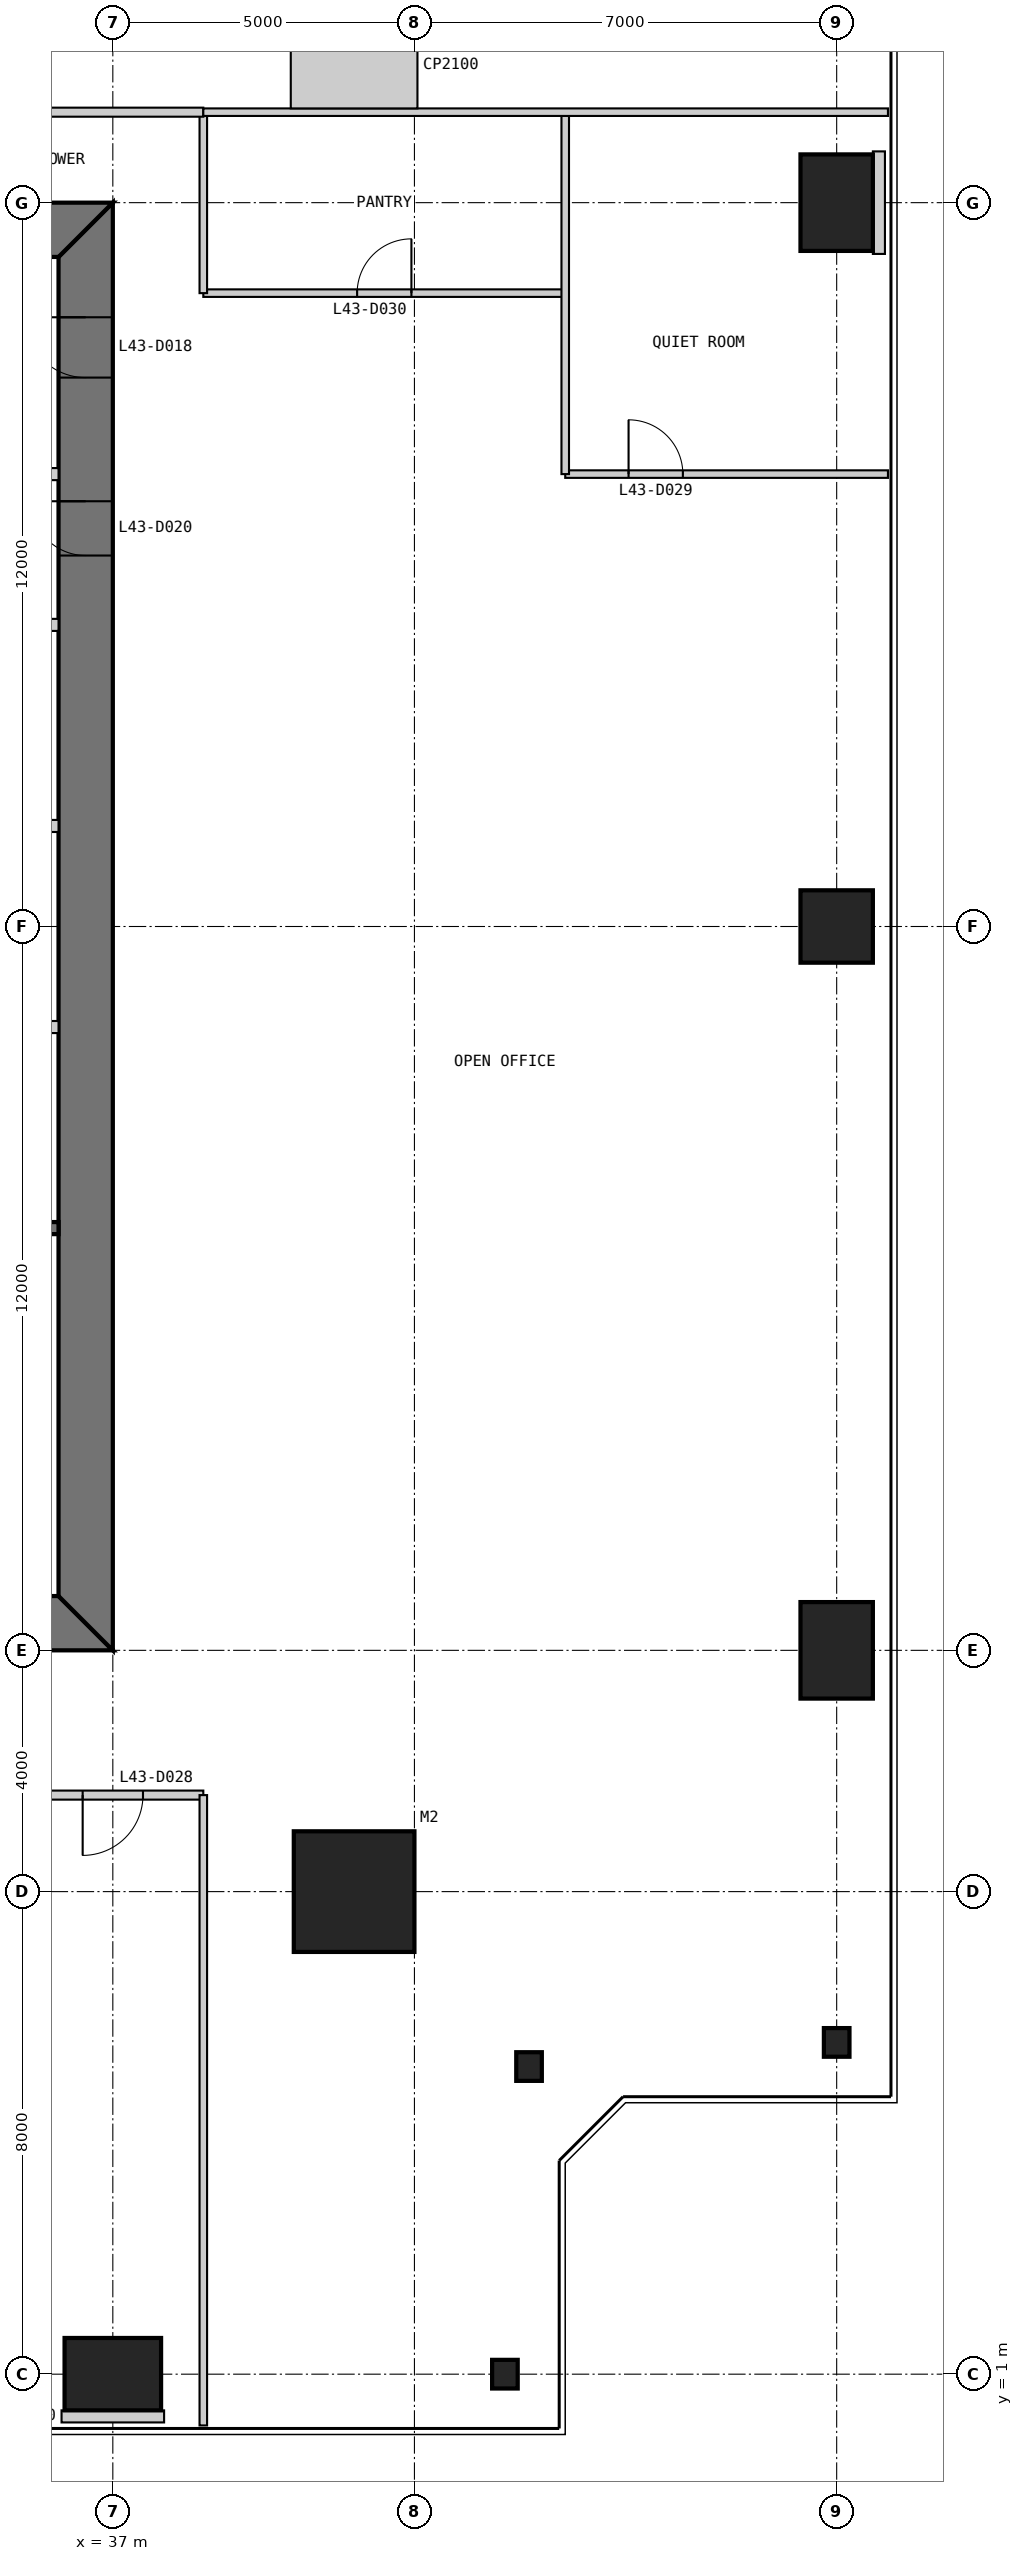
"""IFC4 building model, lengths in metres.
Left out: names, types, materials, properties, quantities, classifications, styles, units other than length and angle.
Written with IfcOpenShell. Run it as: python <this file> out.ifc"""

import sys

from ifc_helpers import new_model, si_unit, direction, frame, frame_2d, origin, origin_2d, place, context, subcontext, project, spatial, polyline, rectangle, i_section, outline, extrude, element, fill, save


model = new_model("IFC4")
c1 = context("Model", 3, precision=1e-05, world=origin(), true_north=direction((0.0, 1.0)))
c2 = subcontext(c1, "Body", "Model", "MODEL_VIEW")
j1 = project(units=[si_unit("LENGTHUNIT", "METRE"), si_unit("PLANEANGLEUNIT", "RADIAN")], contexts=[c1])
p1 = place(None, origin())
s1 = spatial("IfcSite", under=j1, at=p1, CompositionType="ELEMENT")
p2 = place(p1, origin())
s2 = spatial("IfcBuilding", under=s1, at=p2, CompositionType="ELEMENT")
p3 = place(p2, frame((0.0, 0.0, 185.8)))
s3 = spatial("IfcBuildingStorey", under=s2, at=p3, CompositionType="ELEMENT", Elevation=185.8)
p4 = place(p3, frame((41.0, 9.0, 0.0), z_axis=(0.0, 0.0, 1.0), x_axis=(1.0, 0.0, 0.0)))
e1 = element("IfcColumn", 1, at=p4, inside=s3, PredefinedType="COLUMN", context=c2, shape_type="SweptSolid", body=[
    extrude(rectangle(XDim=2.0, YDim=2.0, at=origin_2d()), origin(), (0.0, 0.0, 1.0), 4.0),
])
p5 = place(p3, frame((37.0, 1.0, 0.0), z_axis=(0.0, 0.0, 1.0), x_axis=(1.0, 0.0, 0.0)))
e2 = element("IfcColumn", 2, at=p5, inside=s3, PredefinedType="COLUMN", context=c2, shape_type="SweptSolid", body=[
    extrude(rectangle(XDim=1.6, YDim=1.2, at=origin_2d()), origin(), (0.0, 0.0, 1.0), 4.0),
])
for number, where, z_axis, x_axis in (
    (3, (43.5, 1.0, 0.0), (0.0, 0.0, 1.0), (1.0, 0.0, 0.0)),
    (4, (43.9, 6.1, 0.0), (0.0, 0.0, 1.0), (1.0, 0.0, 0.0)),
    (5, (49.0, 6.5, 0.0), (0.0, 0.0, 1.0), (1.0, 0.0, 0.0)),
):
    element("IfcColumn", number, at=place(p3, frame(where, z_axis=z_axis, x_axis=x_axis)), inside=s3, PredefinedType="COLUMN", context=c2, shape_type="SweptSolid", body=[
        extrude(i_section(OverallWidth=0.424, OverallDepth=0.475, WebThickness=0.048, FlangeThickness=0.077, at=origin_2d()), origin(), (0.0, 0.0, 1.0), 4.0),
    ])
p6 = place(p3, frame((49.0, 13.0, 0.0), z_axis=(0.0, 0.0, 1.0), x_axis=(1.0, 0.0, 0.0)))
e6 = element("IfcColumn", 6, at=p6, inside=s3, PredefinedType="COLUMN", context=c2, shape_type="SweptSolid", body=[
    extrude(rectangle(XDim=1.2, YDim=1.6, at=origin_2d()), origin(), (0.0, 0.0, 1.0), 4.0),
])
p7 = place(p3, frame((49.0, 25.0, 0.0), z_axis=(0.0, 0.0, 1.0), x_axis=(1.0, 0.0, 0.0)))
e7 = element("IfcColumn", 7, at=p7, inside=s3, PredefinedType="COLUMN", context=c2, shape_type="SweptSolid", body=[
    extrude(rectangle(XDim=1.2, YDim=1.2, at=origin_2d()), origin(), (0.0, 0.0, 1.0), 4.0),
])
p8 = place(p3, frame((49.0, 37.0, 0.0), z_axis=(0.0, 0.0, 1.0), x_axis=(1.0, 0.0, 0.0)))
e8 = element("IfcColumn", 8, at=p8, inside=s3, PredefinedType="COLUMN", context=c2, shape_type="SweptSolid", body=[
    extrude(rectangle(XDim=1.2, YDim=1.6, at=origin_2d()), origin(), (0.0, 0.0, 1.0), 4.0),
])
p9 = place(p3, frame((13.0, 13.45, 0.0), z_axis=(0.0, 0.0, 1.0), x_axis=(1.0, 0.0, 0.0)))
e9 = element("IfcWall", 9, at=p9, inside=s3, PredefinedType="SHEAR", context=c2, shape_type="SweptSolid", body=[
    extrude(outline(polyline([(0.0, -0.45), (24.0, -0.45), (23.1, 0.45), (0.9, 0.45), (0.0, -0.45)])), origin(), (0.0, 0.0, 1.0), 4.0),
])
p10 = place(p9, frame((4.9, 0.0, 0.0)))
e10 = element("IfcOpeningElement", 10, at=p10, cuts=e9, PredefinedType="OPENING", context=c2, shape_type="SweptSolid", body=[
    extrude(rectangle(XDim=1.0, YDim=2.2, at=frame_2d((0.5, 1.1))), frame((0.0, 0.46, 0.0), z_axis=(0.0, -1.0, 0.0), x_axis=(1.0, 0.0, 0.0)), (0.0, 0.0, 1.0), 0.92),
])
p11 = place(p9, frame((8.9, 0.0, 0.0)))
e11 = element("IfcOpeningElement", 11, at=p11, cuts=e9, PredefinedType="OPENING", context=c2, shape_type="SweptSolid", body=[
    extrude(rectangle(XDim=1.1, YDim=2.2, at=frame_2d((0.55, 1.1))), frame((0.0, 0.46, 0.0), z_axis=(0.0, -1.0, 0.0), x_axis=(1.0, 0.0, 0.0)), (0.0, 0.0, 1.0), 0.92),
])
p12 = place(p9, frame((15.05, 0.0, 0.0)))
e12 = element("IfcOpeningElement", 12, at=p12, cuts=e9, PredefinedType="OPENING", context=c2, shape_type="SweptSolid", body=[
    extrude(rectangle(XDim=0.9, YDim=2.2, at=frame_2d((0.45, 1.1))), frame((0.0, 0.46, 0.0), z_axis=(0.0, -1.0, 0.0), x_axis=(1.0, 0.0, 0.0)), (0.0, 0.0, 1.0), 0.92),
])
p13 = place(p9, frame((17.9, 0.0, 0.0)))
e13 = element("IfcOpeningElement", 13, at=p13, cuts=e9, PredefinedType="OPENING", context=c2, shape_type="SweptSolid", body=[
    extrude(rectangle(XDim=1.0, YDim=2.2, at=frame_2d((0.5, 1.1))), frame((0.0, 0.46, 0.0), z_axis=(0.0, -1.0, 0.0), x_axis=(1.0, 0.0, 0.0)), (0.0, 0.0, 1.0), 0.92),
])
p14 = place(p9, frame((21.4, 0.0, 0.0)))
e14 = element("IfcOpeningElement", 14, at=p14, cuts=e9, PredefinedType="OPENING", context=c2, shape_type="SweptSolid", body=[
    extrude(rectangle(XDim=1.0, YDim=2.2, at=frame_2d((0.5, 1.1))), frame((0.0, 0.46, 0.0), z_axis=(0.0, -1.0, 0.0), x_axis=(1.0, 0.0, 0.0)), (0.0, 0.0, 1.0), 0.92),
])
p15 = place(p3, frame((36.55, 13.9, 0.0), z_axis=(0.0, 0.0, 1.0), x_axis=(0.0, 1.0, 0.0)))
e15 = element("IfcWall", 15, at=p15, inside=s3, PredefinedType="SHEAR", context=c2, shape_type="SweptSolid", body=[
    extrude(outline(polyline([(-0.9, -0.45), (23.1, -0.45), (22.2, 0.45), (0.0, 0.45), (-0.9, -0.45)])), origin(), (0.0, 0.0, 1.0), 4.0),
])
p16 = place(p15, frame((20.2, 0.0, 0.0)))
e16 = element("IfcOpeningElement", 16, at=p16, cuts=e15, PredefinedType="OPENING", context=c2, shape_type="SweptSolid", body=[
    extrude(rectangle(XDim=1.0, YDim=2.2, at=frame_2d((0.5, 1.1))), frame((0.0, 0.46, 0.0), z_axis=(0.0, -1.0, 0.0), x_axis=(1.0, 0.0, 0.0)), (0.0, 0.0, 1.0), 0.92),
])
p17 = place(p15, frame((17.25, 0.0, 0.0)))
e17 = element("IfcOpeningElement", 17, at=p17, cuts=e15, PredefinedType="OPENING", context=c2, shape_type="SweptSolid", body=[
    extrude(rectangle(XDim=0.9, YDim=2.2, at=frame_2d((0.45, 1.1))), frame((0.0, 0.46, 0.0), z_axis=(0.0, -1.0, 0.0), x_axis=(1.0, 0.0, 0.0)), (0.0, 0.0, 1.0), 0.92),
])
p18 = place(p3, frame((37.0, 36.55, 0.0), z_axis=(0.0, 0.0, 1.0), x_axis=(-1.0, 0.0, 0.0)))
e18 = element("IfcWall", 18, at=p18, inside=s3, PredefinedType="SHEAR", context=c2, shape_type="SweptSolid", body=[
    extrude(outline(polyline([(0.0, -0.45), (24.0, -0.45), (23.1, 0.45), (0.9, 0.45), (0.0, -0.45)])), origin(), (0.0, 0.0, 1.0), 4.0),
])
p19 = place(p18, frame((4.9, 0.0, 0.0)))
e19 = element("IfcOpeningElement", 19, at=p19, cuts=e18, PredefinedType="OPENING", context=c2, shape_type="SweptSolid", body=[
    extrude(rectangle(XDim=1.0, YDim=2.2, at=frame_2d((0.5, 1.1))), frame((0.0, 0.46, 0.0), z_axis=(0.0, -1.0, 0.0), x_axis=(1.0, 0.0, 0.0)), (0.0, 0.0, 1.0), 0.92),
])
p20 = place(p18, frame((8.9, 0.0, 0.0)))
e20 = element("IfcOpeningElement", 20, at=p20, cuts=e18, PredefinedType="OPENING", context=c2, shape_type="SweptSolid", body=[
    extrude(rectangle(XDim=1.1, YDim=2.2, at=frame_2d((0.55, 1.1))), frame((0.0, 0.46, 0.0), z_axis=(0.0, -1.0, 0.0), x_axis=(1.0, 0.0, 0.0)), (0.0, 0.0, 1.0), 0.92),
])
p21 = place(p18, frame((15.05, 0.0, 0.0)))
e21 = element("IfcOpeningElement", 21, at=p21, cuts=e18, PredefinedType="OPENING", context=c2, shape_type="SweptSolid", body=[
    extrude(rectangle(XDim=0.9, YDim=2.2, at=frame_2d((0.45, 1.1))), frame((0.0, 0.46, 0.0), z_axis=(0.0, -1.0, 0.0), x_axis=(1.0, 0.0, 0.0)), (0.0, 0.0, 1.0), 0.92),
])
p22 = place(p18, frame((17.9, 0.0, 0.0)))
e22 = element("IfcOpeningElement", 22, at=p22, cuts=e18, PredefinedType="OPENING", context=c2, shape_type="SweptSolid", body=[
    extrude(rectangle(XDim=1.0, YDim=2.2, at=frame_2d((0.5, 1.1))), frame((0.0, 0.46, 0.0), z_axis=(0.0, -1.0, 0.0), x_axis=(1.0, 0.0, 0.0)), (0.0, 0.0, 1.0), 0.92),
])
p23 = place(p18, frame((21.4, 0.0, 0.0)))
e23 = element("IfcOpeningElement", 23, at=p23, cuts=e18, PredefinedType="OPENING", context=c2, shape_type="SweptSolid", body=[
    extrude(rectangle(XDim=1.0, YDim=2.2, at=frame_2d((0.5, 1.1))), frame((0.0, 0.46, 0.0), z_axis=(0.0, -1.0, 0.0), x_axis=(1.0, 0.0, 0.0)), (0.0, 0.0, 1.0), 0.92),
])
p24 = place(p3, frame((20.3, 20.0, 0.0), z_axis=(0.0, 0.0, 1.0), x_axis=(1.0, 0.0, 0.0)))
e24 = element("IfcWall", 24, at=p24, inside=s3, PredefinedType="SOLIDWALL", context=c2, shape_type="SweptSolid", body=[
    extrude(rectangle(XDim=15.8, YDim=0.2, at=frame_2d((7.9, 0.0))), origin(), (0.0, 0.0, 1.0), 3.8),
])
for number, where, z_axis, x_axis in (
    (25, (36.1, 30.0, 0.0), (0.0, 0.0, 1.0), (-1.0, 0.0, 0.0)),
    (26, (36.1, 26.667, 0.0), (0.0, 0.0, 1.0), (-1.0, 0.0, 0.0)),
    (27, (36.1, 23.333, 0.0), (0.0, 0.0, 1.0), (-1.0, 0.0, 0.0)),
    (28, (36.1, 32.5, 0.0), (0.0, 0.0, 1.0), (-1.0, 0.0, 0.0)),
):
    element("IfcWall", number, at=place(p3, frame(where, z_axis=z_axis, x_axis=x_axis)), inside=s3, PredefinedType="PARTITIONING", context=c2, shape_type="SweptSolid", body=[
        extrude(rectangle(XDim=2.8, YDim=0.2, at=frame_2d((1.4, 0.0))), origin(), (0.0, 0.0, 1.0), 3.8),
    ])
p25 = place(p3, frame((11.5, 10.6, 0.0), z_axis=(0.0, 0.0, 1.0), x_axis=(1.0, 0.0, 0.0)))
e29 = element("IfcWall", 29, at=p25, inside=s3, PredefinedType="PARTITIONING", context=c2, shape_type="SweptSolid", body=[
    extrude(rectangle(XDim=27.0, YDim=0.15, at=frame_2d((13.5, 0.0))), origin(), (0.0, 0.0, 1.0), 3.85),
])
p26 = place(p25, frame((12.25, 0.0, 0.0)))
e30 = element("IfcOpeningElement", 30, at=p26, cuts=e29, PredefinedType="OPENING", context=c2, shape_type="SweptSolid", body=[
    extrude(rectangle(XDim=1.0, YDim=2.2, at=frame_2d((0.5, 1.1))), frame((0.0, 0.085, 0.0), z_axis=(0.0, -1.0, 0.0), x_axis=(1.0, 0.0, 0.0)), (0.0, 0.0, 1.0), 0.17),
])
p27 = place(p25, frame((19.75, 0.0, 0.0)))
e31 = element("IfcOpeningElement", 31, at=p27, cuts=e29, PredefinedType="OPENING", context=c2, shape_type="SweptSolid", body=[
    extrude(rectangle(XDim=1.0, YDim=2.2, at=frame_2d((0.5, 1.1))), frame((0.0, 0.085, 0.0), z_axis=(0.0, -1.0, 0.0), x_axis=(1.0, 0.0, 0.0)), (0.0, 0.0, 1.0), 0.17),
])
p28 = place(p25, frame((0.25, 0.0, 0.0)))
e32 = element("IfcOpeningElement", 32, at=p28, cuts=e29, PredefinedType="OPENING", context=c2, shape_type="SweptSolid", body=[
    extrude(rectangle(XDim=1.0, YDim=2.2, at=frame_2d((0.5, 1.1))), frame((0.0, 0.085, 0.0), z_axis=(0.0, -1.0, 0.0), x_axis=(1.0, 0.0, 0.0)), (0.0, 0.0, 1.0), 0.17),
])
p29 = place(p25, frame((10.75, 0.0, 0.0)))
e33 = element("IfcOpeningElement", 33, at=p29, cuts=e29, PredefinedType="OPENING", context=c2, shape_type="SweptSolid", body=[
    extrude(rectangle(XDim=1.0, YDim=2.2, at=frame_2d((0.5, 1.1))), frame((0.0, 0.085, 0.0), z_axis=(0.0, -1.0, 0.0), x_axis=(1.0, 0.0, 0.0)), (0.0, 0.0, 1.0), 0.17),
])
p30 = place(p25, frame((22.0, 0.0, 0.0)))
e34 = element("IfcOpeningElement", 34, at=p30, cuts=e29, PredefinedType="OPENING", context=c2, shape_type="SweptSolid", body=[
    extrude(rectangle(XDim=1.0, YDim=2.2, at=frame_2d((0.5, 1.1))), frame((0.0, 0.085, 0.0), z_axis=(0.0, -1.0, 0.0), x_axis=(1.0, 0.0, 0.0)), (0.0, 0.0, 1.0), 0.17),
])
p31 = place(p25, frame((25.0, 0.0, 0.0)))
e35 = element("IfcOpeningElement", 35, at=p31, cuts=e29, PredefinedType="OPENING", context=c2, shape_type="SweptSolid", body=[
    extrude(rectangle(XDim=1.0, YDim=2.2, at=frame_2d((0.5, 1.1))), frame((0.0, 0.085, 0.0), z_axis=(0.0, -1.0, 0.0), x_axis=(1.0, 0.0, 0.0)), (0.0, 0.0, 1.0), 0.17),
])
p32 = place(p3, frame((38.5, 0.15, 0.0), z_axis=(0.0, 0.0, 1.0), x_axis=(0.0, 1.0, 0.0)))
e36 = element("IfcWall", 36, at=p32, inside=s3, PredefinedType="PARTITIONING", context=c2, shape_type="SweptSolid", body=[
    extrude(rectangle(XDim=10.45, YDim=0.125, at=frame_2d((5.225, 0.0))), origin(), (0.0, 0.0, 1.0), 3.85),
])
p33 = place(p3, frame((49.85, 32.5, 0.0), z_axis=(0.0, 0.0, 1.0), x_axis=(-1.0, 0.0, 0.0)))
e37 = element("IfcWall", 37, at=p33, inside=s3, PredefinedType="PARTITIONING", context=c2, shape_type="SweptSolid", body=[
    extrude(rectangle(XDim=5.35, YDim=0.125, at=frame_2d((2.675, 0.0))), origin(), (0.0, 0.0, 1.0), 3.85),
])
p34 = place(p33, frame((3.4, 0.0, 0.0)))
e38 = element("IfcOpeningElement", 38, at=p34, cuts=e37, PredefinedType="OPENING", context=c2, shape_type="SweptSolid", body=[
    extrude(rectangle(XDim=0.9, YDim=2.2, at=frame_2d((0.45, 1.1))), frame((0.0, 0.073, 0.0), z_axis=(0.0, -1.0, 0.0), x_axis=(1.0, 0.0, 0.0)), (0.0, 0.0, 1.0), 0.145),
])
p35 = place(p3, frame((44.5, 35.5, 0.0), z_axis=(0.0, 0.0, 1.0), x_axis=(-1.0, 0.0, 0.0)))
e39 = element("IfcWall", 39, at=p35, inside=s3, PredefinedType="PARTITIONING", context=c2, shape_type="SweptSolid", body=[
    extrude(rectangle(XDim=6.0, YDim=0.125, at=frame_2d((3.0, 0.0))), origin(), (0.0, 0.0, 1.0), 3.85),
])
p36 = place(p35, frame((2.55, 0.0, 0.0)))
e40 = element("IfcOpeningElement", 40, at=p36, cuts=e39, PredefinedType="OPENING", context=c2, shape_type="SweptSolid", body=[
    extrude(rectangle(XDim=0.9, YDim=2.2, at=frame_2d((0.45, 1.1))), frame((0.0, 0.073, 0.0), z_axis=(0.0, -1.0, 0.0), x_axis=(1.0, 0.0, 0.0)), (0.0, 0.0, 1.0), 0.145),
])
p37 = place(p3, frame((44.5, 32.5, 0.0), z_axis=(0.0, 0.0, 1.0), x_axis=(0.0, 1.0, 0.0)))
e41 = element("IfcWall", 41, at=p37, inside=s3, PredefinedType="PARTITIONING", context=c2, shape_type="SweptSolid", body=[
    extrude(rectangle(XDim=6.0, YDim=0.125, at=frame_2d((3.0, 0.0))), origin(), (0.0, 0.0, 1.0), 3.85),
])
p38 = place(p3, frame((38.5, 35.5, 0.0), z_axis=(0.0, 0.0, 1.0), x_axis=(0.0, 1.0, 0.0)))
e42 = element("IfcWall", 42, at=p38, inside=s3, PredefinedType="PARTITIONING", context=c2, shape_type="SweptSolid", body=[
    extrude(rectangle(XDim=3.0, YDim=0.125, at=frame_2d((1.5, 0.0))), origin(), (0.0, 0.0, 1.0), 3.85),
])
p39 = place(p3, frame((38.5, 38.5, 0.0), z_axis=(0.0, 0.0, 1.0), x_axis=(-1.0, 0.0, 0.0)))
e43 = element("IfcWall", 43, at=p39, inside=s3, PredefinedType="PARTITIONING", context=c2, shape_type="SweptSolid", body=[
    extrude(rectangle(XDim=27.0, YDim=0.15, at=frame_2d((13.5, 0.0))), origin(), (0.0, 0.0, 1.0), 3.85),
])
p40 = place(p39, frame((13.0, 0.0, 0.0)))
e44 = element("IfcOpeningElement", 44, at=p40, cuts=e43, PredefinedType="OPENING", context=c2, shape_type="SweptSolid", body=[
    extrude(rectangle(XDim=1.0, YDim=2.2, at=frame_2d((0.5, 1.1))), frame((0.0, 0.085, 0.0), z_axis=(0.0, -1.0, 0.0), x_axis=(1.0, 0.0, 0.0)), (0.0, 0.0, 1.0), 0.17),
])
p41 = place(p3, frame((49.85, 38.5, 0.0), z_axis=(0.0, 0.0, 1.0), x_axis=(-1.0, 0.0, 0.0)))
e45 = element("IfcWall", 45, at=p41, inside=s3, PredefinedType="PARTITIONING", context=c2, shape_type="SweptSolid", body=[
    extrude(rectangle(XDim=11.35, YDim=0.125, at=frame_2d((5.675, 0.0))), origin(), (0.0, 0.0, 1.0), 3.85),
])
for number, where, z_axis, x_axis in (
    (46, (37.0, 0.2, 0.0), (0.0, 0.0, 1.0), (0.0, 1.0, 0.0)),
    (47, (49.8, 37.0, 0.0), (0.0, 0.0, 1.0), (-1.0, 0.0, 0.0)),
):
    element("IfcWall", number, at=place(p3, frame(where, z_axis=z_axis, x_axis=x_axis)), inside=s3, PredefinedType="PARTITIONING", context=c2, shape_type="SweptSolid", body=[
        extrude(rectangle(XDim=0.2, YDim=1.7, at=frame_2d((0.1, 0.0))), origin(), (0.0, 0.0, 1.0), 3.85),
    ])
p42 = place(p3, frame((41.0, 38.562, 0.0), z_axis=(0.0, 0.0, 1.0), x_axis=(0.0, 1.0, 0.0)))
e48 = element("IfcWall", 48, at=p42, inside=s3, PredefinedType="PARTITIONING", context=c2, shape_type="SweptSolid", body=[
    extrude(rectangle(XDim=1.438, YDim=2.1, at=frame_2d((0.719, 0.0))), origin(), (0.0, 0.0, 1.0), 3.85),
])
p43 = place(p16, origin())
e49 = element("IfcDoor", 49, at=p43, inside=s3, OperationType="SINGLE_SWING_RIGHT", PredefinedType="DOOR", context=c2, shape_type="SweptSolid", body=[
    extrude(rectangle(XDim=1.0, YDim=2.2, at=frame_2d((0.5, 1.1))), frame((0.0, 0.025, 0.0), z_axis=(0.0, -1.0, 0.0), x_axis=(1.0, 0.0, 0.0)), (0.0, 0.0, 1.0), 0.05),
    extrude(outline(polyline([(0.0, 0.0), (0.04, 0.0), (0.04, 2.16), (0.96, 2.16), (0.96, 0.0), (1.0, 0.0), (1.0, 2.2), (0.0, 2.2), (0.0, 0.0)])), frame((0.0, 0.3, 0.0), z_axis=(0.0, -1.0, 0.0), x_axis=(1.0, 0.0, 0.0)), (0.0, 0.0, 1.0), 0.6),
])
fill(e16, e49)
p44 = place(p17, origin())
e50 = element("IfcDoor", 50, at=p44, inside=s3, OperationType="SINGLE_SWING_RIGHT", PredefinedType="DOOR", context=c2, shape_type="SweptSolid", body=[
    extrude(rectangle(XDim=0.9, YDim=2.2, at=frame_2d((0.45, 1.1))), frame((0.0, 0.025, 0.0), z_axis=(0.0, -1.0, 0.0), x_axis=(1.0, 0.0, 0.0)), (0.0, 0.0, 1.0), 0.05),
    extrude(outline(polyline([(0.0, 0.0), (0.04, 0.0), (0.04, 2.16), (0.86, 2.16), (0.86, 0.0), (0.9, 0.0), (0.9, 2.2), (0.0, 2.2), (0.0, 0.0)])), frame((0.0, 0.3, 0.0), z_axis=(0.0, -1.0, 0.0), x_axis=(1.0, 0.0, 0.0)), (0.0, 0.0, 1.0), 0.6),
])
fill(e17, e50)
p45 = place(p31, frame((1.0, 0.0, 0.0), z_axis=(0.0, 0.0, 1.0), x_axis=(-1.0, 0.0, 0.0)))
e51 = element("IfcDoor", 51, at=p45, inside=s3, OperationType="SINGLE_SWING_RIGHT", PredefinedType="DOOR", context=c2, shape_type="SweptSolid", body=[
    extrude(rectangle(XDim=1.0, YDim=2.2, at=frame_2d((0.5, 1.1))), frame((0.0, 0.025, 0.0), z_axis=(0.0, -1.0, 0.0), x_axis=(1.0, 0.0, 0.0)), (0.0, 0.0, 1.0), 0.05),
])
fill(e35, e51)
p46 = place(p34, frame((0.9, 0.0, 0.0), z_axis=(0.0, 0.0, 1.0), x_axis=(-1.0, 0.0, 0.0)))
e52 = element("IfcDoor", 52, at=p46, inside=s3, OperationType="SINGLE_SWING_LEFT", PredefinedType="DOOR", context=c2, shape_type="SweptSolid", body=[
    extrude(rectangle(XDim=0.9, YDim=2.2, at=frame_2d((0.45, 1.1))), frame((0.0, 0.025, 0.0), z_axis=(0.0, -1.0, 0.0), x_axis=(1.0, 0.0, 0.0)), (0.0, 0.0, 1.0), 0.05),
])
fill(e38, e52)
p47 = place(p36, frame((0.9, 0.0, 0.0), z_axis=(0.0, 0.0, 1.0), x_axis=(-1.0, 0.0, 0.0)))
e53 = element("IfcDoor", 53, at=p47, inside=s3, OperationType="SINGLE_SWING_RIGHT", PredefinedType="DOOR", context=c2, shape_type="SweptSolid", body=[
    extrude(rectangle(XDim=0.9, YDim=2.2, at=frame_2d((0.45, 1.1))), frame((0.0, 0.025, 0.0), z_axis=(0.0, -1.0, 0.0), x_axis=(1.0, 0.0, 0.0)), (0.0, 0.0, 1.0), 0.05),
])
fill(e40, e53)
save(model, sys.argv[1])
